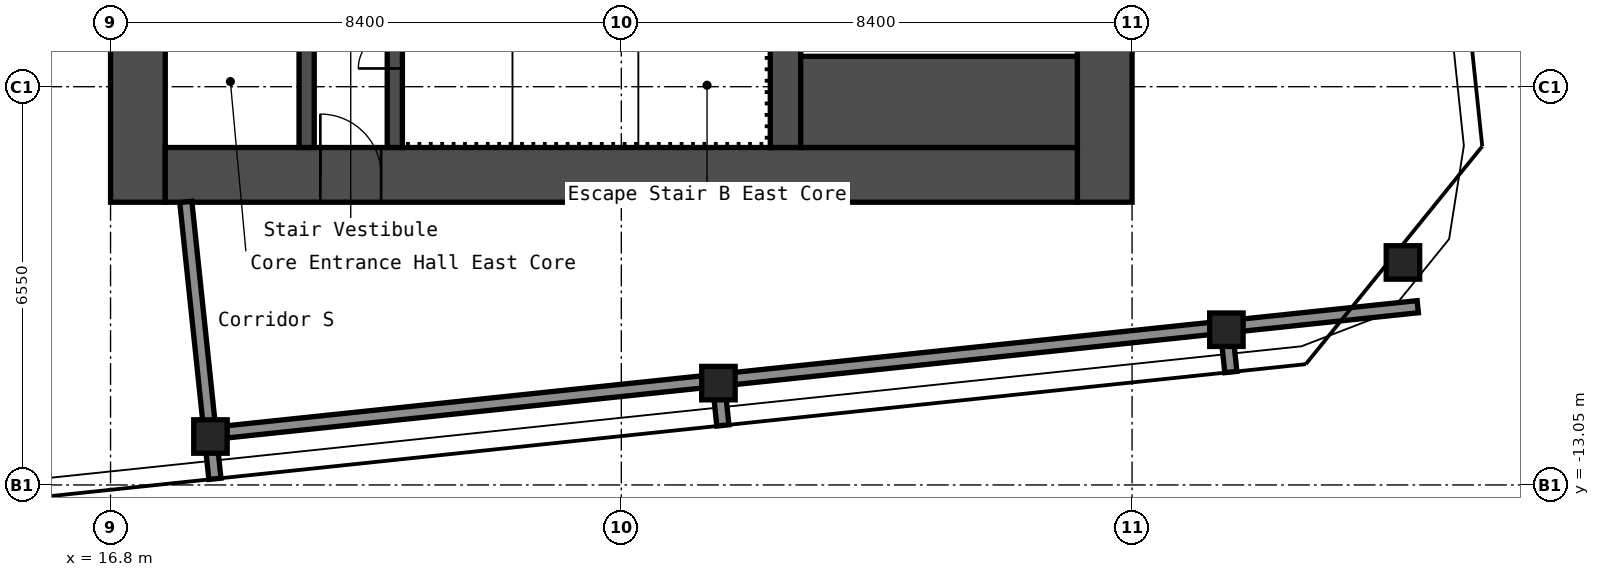
"""IFC4 building model, lengths in metres.
Left out: names, types, materials, properties, quantities, classifications, styles, units other than length and angle.
Written with IfcOpenShell. Run it as: python <this file> out.ifc"""

import sys

from ifc_helpers import new_model, si_unit, direction, frame, frame_2d, origin, origin_2d, place, context, subcontext, project, spatial, rectangle, hollow_rectangle, extrude, element, fill, save


model = new_model("IFC4")
c1 = context("Model", 3, precision=1e-05, world=origin(), true_north=direction((0.0, 1.0)))
c2 = subcontext(c1, "Body", "Model", "MODEL_VIEW")
j1 = project(units=[si_unit("LENGTHUNIT", "METRE"), si_unit("PLANEANGLEUNIT", "RADIAN")], contexts=[c1])
p1 = place(None, origin())
s1 = spatial("IfcSite", under=j1, at=p1, CompositionType="ELEMENT")
p2 = place(p1, origin())
s2 = spatial("IfcBuilding", under=s1, at=p2, CompositionType="ELEMENT")
p3 = place(p2, frame((0.0, 0.0, 242.2)))
s3 = spatial("IfcBuildingStorey", under=s2, at=p3, CompositionType="ELEMENT", Elevation=242.2)
for number, where, z_axis, x_axis in (
    (1, (18.443, -12.253, 0.0), (0.0, 0.0, 1.0), (1.0, 0.0, 0.0)),
    (2, (26.797, -11.375, 0.0), (0.0, 0.0, 1.0), (1.0, 0.0, 0.0)),
    (3, (35.151, -10.497, 0.0), (0.0, 0.0, 1.0), (1.0, 0.0, 0.0)),
    (4, (38.054, -9.39, 0.0), (0.0, 0.0, 1.0), (1.0, 0.0, 0.0)),
):
    element("IfcColumn", number, at=place(p3, frame(where, z_axis=z_axis, x_axis=x_axis)), inside=s3, PredefinedType="COLUMN", context=c2, shape_type="SweptSolid", body=[
        extrude(hollow_rectangle(XDim=0.55, YDim=0.55, WallThickness=0.022, InnerFilletRadius=0.033, OuterFilletRadius=0.055, at=origin_2d()), origin(), (0.0, 0.0, 1.0), 2.75),
    ])
p4 = place(p3, frame((17.25, -8.4, 0.0), z_axis=(0.0, 0.0, 1.0), x_axis=(0.0, 1.0, 0.0)))
e5 = element("IfcWall", 5, at=p4, inside=s3, PredefinedType="SHEAR", context=c2, shape_type="SweptSolid", body=[
    extrude(rectangle(XDim=16.8, YDim=0.9, at=frame_2d((8.4, 0.0))), origin(), (0.0, 0.0, 1.0), 2.75),
])
p5 = place(p4, frame((11.879, 0.0, 0.0)))
e6 = element("IfcOpeningElement", 6, at=p5, cuts=e5, PredefinedType="OPENING", context=c2, shape_type="SweptSolid", body=[
    extrude(rectangle(XDim=1.6, YDim=2.1, at=frame_2d((0.8, 1.05))), frame((0.0, 0.46, 0.0), z_axis=(0.0, -1.0, 0.0), x_axis=(1.0, 0.0, 0.0)), (0.0, 0.0, 1.0), 0.92),
])
p6 = place(p3, frame((33.15, -8.4, 0.0), z_axis=(0.0, 0.0, 1.0), x_axis=(0.0, 1.0, 0.0)))
e7 = element("IfcWall", 7, at=p6, inside=s3, PredefinedType="SHEAR", context=c2, shape_type="SweptSolid", body=[
    extrude(rectangle(XDim=16.8, YDim=0.9, at=frame_2d((8.4, 0.0))), origin(), (0.0, 0.0, 1.0), 2.75),
])
p7 = place(p3, frame((17.7, -7.95, 0.0), z_axis=(0.0, 0.0, 1.0), x_axis=(1.0, 0.0, 0.0)))
e8 = element("IfcWall", 8, at=p7, inside=s3, PredefinedType="SHEAR", context=c2, shape_type="SweptSolid", body=[
    extrude(rectangle(XDim=15.0, YDim=0.9, at=frame_2d((7.5, 0.0))), origin(), (0.0, 0.0, 1.0), 2.75),
])
p8 = place(p7, frame((2.55, 0.0, 0.0)))
e9 = element("IfcOpeningElement", 9, at=p8, cuts=e8, PredefinedType="OPENING", context=c2, shape_type="SweptSolid", body=[
    extrude(rectangle(XDim=1.0, YDim=2.1, at=frame_2d((0.5, 1.05))), frame((0.0, 0.46, 0.0), z_axis=(0.0, -1.0, 0.0), x_axis=(1.0, 0.0, 0.0)), (0.0, 0.0, 1.0), 0.92),
])
p9 = place(p3, frame((20.025, -7.5, 0.0), z_axis=(0.0, 0.0, 1.0), x_axis=(0.0, 1.0, 0.0)))
e10 = element("IfcWall", 10, at=p9, inside=s3, PredefinedType="SHEAR", context=c2, shape_type="SweptSolid", body=[
    extrude(rectangle(XDim=6.3, YDim=0.25, at=frame_2d((3.15, 0.0))), origin(), (0.0, 0.0, 1.0), 2.75),
])
p10 = place(p9, frame((2.4, 0.0, 0.0)))
e11 = element("IfcOpeningElement", 11, at=p10, cuts=e10, PredefinedType="OPENING", context=c2, shape_type="SweptSolid", body=[
    extrude(rectangle(XDim=1.0, YDim=2.1, at=frame_2d((0.5, 1.05))), frame((0.0, 0.135, 0.0), z_axis=(0.0, -1.0, 0.0), x_axis=(1.0, 0.0, 0.0)), (0.0, 0.0, 1.0), 0.27),
])
p11 = place(p3, frame((21.475, -7.5, 0.0), z_axis=(0.0, 0.0, 1.0), x_axis=(0.0, 1.0, 0.0)))
e12 = element("IfcWall", 12, at=p11, inside=s3, PredefinedType="SHEAR", context=c2, shape_type="SweptSolid", body=[
    extrude(rectangle(XDim=3.75, YDim=0.25, at=frame_2d((1.875, 0.0))), origin(), (0.0, 0.0, 1.0), 2.75),
])
p12 = place(p11, frame((1.3, 0.0, 0.0)))
e13 = element("IfcOpeningElement", 13, at=p12, cuts=e12, PredefinedType="OPENING", context=c2, shape_type="SweptSolid", body=[
    extrude(rectangle(XDim=1.2, YDim=2.1, at=frame_2d((0.6, 1.05))), frame((0.0, 0.135, 0.0), z_axis=(0.0, -1.0, 0.0), x_axis=(1.0, 0.0, 0.0)), (0.0, 0.0, 1.0), 0.27),
])
p13 = place(p3, frame((27.9, -7.5, 0.0), z_axis=(0.0, 0.0, 1.0), x_axis=(0.0, 1.0, 0.0)))
e14 = element("IfcWall", 14, at=p13, inside=s3, PredefinedType="SHEAR", context=c2, shape_type="SweptSolid", body=[
    extrude(rectangle(XDim=3.75, YDim=0.5, at=frame_2d((1.875, 0.0))), origin(), (0.0, 0.0, 1.0), 2.75),
])
p14 = place(p3, frame((28.15, -6.75, 0.0), z_axis=(0.0, 0.0, 1.0), x_axis=(1.0, 0.0, 0.0)))
e15 = element("IfcWall", 15, at=p14, inside=s3, PredefinedType="SHEAR", context=c2, shape_type="SweptSolid", body=[
    extrude(rectangle(XDim=4.55, YDim=1.5, at=frame_2d((2.275, 0.0))), origin(), (0.0, 0.0, 1.0), 2.75),
])
p15 = place(p3, frame((18.708, -12.177, 0.0), z_axis=(0.0, 0.0, 1.0), x_axis=(0.994521604238, 0.104531233147, 0.0)))
e16 = element("IfcWall", 16, at=p15, inside=s3, PredefinedType="PARTITIONING", context=c2, shape_type="SweptSolid", body=[
    extrude(rectangle(XDim=19.698, YDim=0.2, at=frame_2d((9.849, 0.0))), origin(), (0.0, 0.0, 1.0), 2.75),
])
p16 = place(p3, frame((18.516, -12.949, 0.0), z_axis=(0.0, 0.0, 1.0), x_axis=(-0.104548796268, 0.994519758074, 0.0)))
e17 = element("IfcWall", 17, at=p16, inside=s3, PredefinedType="PARTITIONING", context=c2, shape_type="SweptSolid", body=[
    extrude(rectangle(XDim=4.579, YDim=0.2, at=frame_2d((2.29, 0.0))), origin(), (0.0, 0.0, 1.0), 2.75),
])
for number, where, z_axis, x_axis in (
    (18, (26.87, -12.071, 0.0), (0.0, 0.0, 1.0), (-0.105, 0.994, 0.0)),
    (19, (35.224, -11.193, 0.0), (0.0, 0.0, 1.0), (-0.105, 0.994, 0.0)),
):
    element("IfcWall", number, at=place(p3, frame(where, z_axis=z_axis, x_axis=x_axis)), inside=s3, PredefinedType="PARTITIONING", context=c2, shape_type="SweptSolid", body=[
        extrude(rectangle(XDim=0.434, YDim=0.2, at=frame_2d((0.217, 0.0))), origin(), (0.0, 0.0, 1.0), 2.75),
    ])
p17 = place(p8, origin())
e20 = element("IfcDoor", 20, at=p17, inside=s3, OperationType="SINGLE_SWING_RIGHT", PredefinedType="DOOR", context=c2, shape_type="SweptSolid", body=[
    extrude(rectangle(XDim=1.0, YDim=2.1, at=frame_2d((0.5, 1.05))), frame((0.0, 0.025, 0.0), z_axis=(0.0, -1.0, 0.0), x_axis=(1.0, 0.0, 0.0)), (0.0, 0.0, 1.0), 0.05),
])
fill(e9, e20)
p18 = place(p12, origin())
e21 = element("IfcDoor", 21, at=p18, inside=s3, OperationType="DOUBLE_DOOR_SINGLE_SWING", PredefinedType="DOOR", context=c2, shape_type="SweptSolid", body=[
    extrude(rectangle(XDim=1.2, YDim=2.1, at=frame_2d((0.6, 1.05))), frame((0.0, 0.025, 0.0), z_axis=(0.0, -1.0, 0.0), x_axis=(1.0, 0.0, 0.0)), (0.0, 0.0, 1.0), 0.05),
])
fill(e13, e21)
save(model, sys.argv[1])
